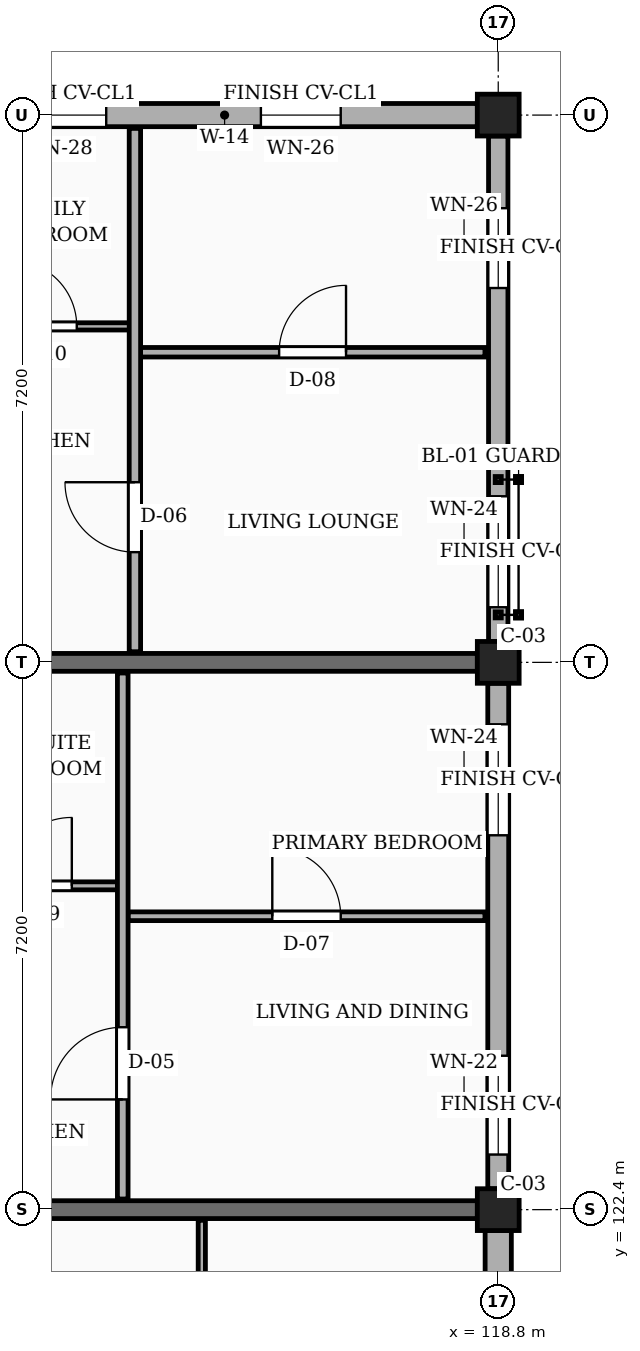
"""IFC4 building model, lengths in metres.
Left out: names, types, materials, properties, quantities, classifications, styles, units other than length and angle.
Written with IfcOpenShell. Run it as: python <this file> out.ifc"""

import sys

from ifc_helpers import new_model, si_unit, direction, frame, frame_2d, origin, origin_2d, place, context, subcontext, project, spatial, rectangle, extrude, element, fill, save


model = new_model("IFC4")
c1 = context("Model", 3, precision=1e-05, world=origin(), true_north=direction((0.0, 1.0)))
c2 = subcontext(c1, "Body", "Model", "MODEL_VIEW")
j1 = project(units=[si_unit("LENGTHUNIT", "METRE"), si_unit("PLANEANGLEUNIT", "RADIAN")], contexts=[c1])
p1 = place(None, origin())
s1 = spatial("IfcSite", under=j1, at=p1, CompositionType="ELEMENT")
p2 = place(p1, origin())
s2 = spatial("IfcBuilding", under=s1, at=p2, CompositionType="ELEMENT")
p3 = place(p2, frame((0.0, 0.0, 20.25)))
s3 = spatial("IfcBuildingStorey", under=s2, at=p3, CompositionType="ELEMENT", Elevation=20.25)
for number, where, z_axis, x_axis in (
    (1, (118.8, 122.4, 0.0), (0.0, 0.0, 1.0), (1.0, 0.0, 0.0)),
    (2, (118.8, 129.6, 0.0), (0.0, 0.0, 1.0), (1.0, 0.0, 0.0)),
    (3, (118.8, 136.8, 0.0), (0.0, 0.0, 1.0), (1.0, 0.0, 0.0)),
):
    element("IfcColumn", number, at=place(p3, frame(where, z_axis=z_axis, x_axis=x_axis)), inside=s3, PredefinedType="COLUMN", context=c2, shape_type="SweptSolid", body=[
        extrude(rectangle(XDim=0.55, YDim=0.55, at=origin_2d()), origin(), (0.0, 0.0, 1.0), 3.15),
    ])
for number, where, z_axis, x_axis in (
    (4, (111.825, 122.4, 0.0), (0.0, 0.0, 1.0), (1.0, 0.0, 0.0)),
    (5, (111.825, 129.6, 0.0), (0.0, 0.0, 1.0), (1.0, 0.0, 0.0)),
):
    element("IfcWall", number, at=place(p3, frame(where, z_axis=z_axis, x_axis=x_axis)), inside=s3, PredefinedType="SOLIDWALL", context=c2, shape_type="SweptSolid", body=[
        extrude(rectangle(XDim=6.7, YDim=0.235, at=frame_2d((3.35, 0.0))), origin(), (0.0, 0.0, 1.0), 2.19),
    ])
p4 = place(p3, frame((118.8, 115.475, 0.0), z_axis=(0.0, 0.0, 1.0), x_axis=(0.0, 1.0, 0.0)))
e6 = element("IfcWall", 6, at=p4, inside=s3, PredefinedType="SOLIDWALL", context=c2, shape_type="SweptSolid", body=[
    extrude(rectangle(XDim=6.65, YDim=0.345, at=frame_2d((3.325, 0.0))), origin(), (0.0, 0.0, 1.0), 2.46),
])
p5 = place(p4, frame((0.45, 0.0, 0.78)))
e7 = element("IfcOpeningElement", 7, at=p5, cuts=e6, PredefinedType="OPENING", context=c2, shape_type="SweptSolid", body=[
    extrude(rectangle(XDim=1.14, YDim=1.36, at=frame_2d((0.57, 0.68))), frame((0.0, 0.183, 0.0), z_axis=(0.0, -1.0, 0.0), x_axis=(1.0, 0.0, 0.0)), (0.0, 0.0, 1.0), 0.365),
])
p6 = place(p4, frame((4.65, 0.0, 0.78)))
e8 = element("IfcOpeningElement", 8, at=p6, cuts=e6, PredefinedType="OPENING", context=c2, shape_type="SweptSolid", body=[
    extrude(rectangle(XDim=1.3, YDim=1.36, at=frame_2d((0.65, 0.68))), frame((0.0, 0.183, 0.0), z_axis=(0.0, -1.0, 0.0), x_axis=(1.0, 0.0, 0.0)), (0.0, 0.0, 1.0), 0.365),
])
p7 = place(p3, frame((118.8, 122.675, 0.0), z_axis=(0.0, 0.0, 1.0), x_axis=(0.0, 1.0, 0.0)))
e9 = element("IfcWall", 9, at=p7, inside=s3, PredefinedType="SOLIDWALL", context=c2, shape_type="SweptSolid", body=[
    extrude(rectangle(XDim=6.65, YDim=0.275, at=frame_2d((3.325, 0.0))), origin(), (0.0, 0.0, 1.0), 2.46),
])
p8 = place(p7, frame((0.45, 0.0, 0.78)))
e10 = element("IfcOpeningElement", 10, at=p8, cuts=e9, PredefinedType="OPENING", context=c2, shape_type="SweptSolid", body=[
    extrude(rectangle(XDim=1.3, YDim=1.36, at=frame_2d((0.65, 0.68))), frame((0.0, 0.147, 0.0), z_axis=(0.0, -1.0, 0.0), x_axis=(1.0, 0.0, 0.0)), (0.0, 0.0, 1.0), 0.295),
])
p9 = place(p7, frame((4.65, 0.0, 0.78)))
e11 = element("IfcOpeningElement", 11, at=p9, cuts=e9, PredefinedType="OPENING", context=c2, shape_type="SweptSolid", body=[
    extrude(rectangle(XDim=1.46, YDim=1.36, at=frame_2d((0.73, 0.68))), frame((0.0, 0.147, 0.0), z_axis=(0.0, -1.0, 0.0), x_axis=(1.0, 0.0, 0.0)), (0.0, 0.0, 1.0), 0.295),
])
p10 = place(p3, frame((118.8, 129.875, 0.0), z_axis=(0.0, 0.0, 1.0), x_axis=(0.0, 1.0, 0.0)))
e12 = element("IfcWall", 12, at=p10, inside=s3, PredefinedType="SOLIDWALL", context=c2, shape_type="SweptSolid", body=[
    extrude(rectangle(XDim=6.65, YDim=0.255, at=frame_2d((3.325, 0.0))), origin(), (0.0, 0.0, 1.0), 2.46),
])
p11 = place(p10, frame((0.45, 0.0, 0.78)))
e13 = element("IfcOpeningElement", 13, at=p11, cuts=e12, PredefinedType="OPENING", context=c2, shape_type="SweptSolid", body=[
    extrude(rectangle(XDim=1.46, YDim=1.36, at=frame_2d((0.73, 0.68))), frame((0.0, 0.137, 0.0), z_axis=(0.0, -1.0, 0.0), x_axis=(1.0, 0.0, 0.0)), (0.0, 0.0, 1.0), 0.275),
])
p12 = place(p10, frame((4.65, 0.0, 0.78)))
e14 = element("IfcOpeningElement", 14, at=p12, cuts=e12, PredefinedType="OPENING", context=c2, shape_type="SweptSolid", body=[
    extrude(rectangle(XDim=1.05, YDim=1.44, at=frame_2d((0.525, 0.72))), frame((0.0, 0.137, 0.0), z_axis=(0.0, -1.0, 0.0), x_axis=(1.0, 0.0, 0.0)), (0.0, 0.0, 1.0), 0.275),
])
p13 = place(p3, frame((118.525, 136.8, 0.0), z_axis=(0.0, 0.0, 1.0), x_axis=(-1.0, 0.0, 0.0)))
e15 = element("IfcWall", 15, at=p13, inside=s3, PredefinedType="SOLIDWALL", context=c2, shape_type="SweptSolid", body=[
    extrude(rectangle(XDim=6.65, YDim=0.305, at=frame_2d((3.325, 0.0))), origin(), (0.0, 0.0, 1.0), 2.46),
])
p14 = place(p13, frame((1.798, 0.0, 0.78)))
e16 = element("IfcOpeningElement", 16, at=p14, cuts=e15, PredefinedType="OPENING", context=c2, shape_type="SweptSolid", body=[
    extrude(rectangle(XDim=1.05, YDim=1.44, at=frame_2d((0.525, 0.72))), frame((0.0, 0.163, 0.0), z_axis=(0.0, -1.0, 0.0), x_axis=(1.0, 0.0, 0.0)), (0.0, 0.0, 1.0), 0.325),
])
p15 = place(p13, frame((4.883, 0.0, 0.78)))
e17 = element("IfcOpeningElement", 17, at=p15, cuts=e15, PredefinedType="OPENING", context=c2, shape_type="SweptSolid", body=[
    extrude(rectangle(XDim=1.25, YDim=1.44, at=frame_2d((0.625, 0.72))), frame((0.0, 0.163, 0.0), z_axis=(0.0, -1.0, 0.0), x_axis=(1.0, 0.0, 0.0)), (0.0, 0.0, 1.0), 0.325),
])
p16 = place(p3, frame((114.9, 119.07, 0.0), z_axis=(0.0, 0.0, 1.0), x_axis=(0.0, 1.0, 0.0)))
e18 = element("IfcWall", 18, at=p16, inside=s3, PredefinedType="PARTITIONING", context=c2, shape_type="SweptSolid", body=[
    extrude(rectangle(XDim=3.19, YDim=0.095, at=frame_2d((1.595, 0.0))), origin(), (0.0, 0.0, 1.0), 2.325),
])
p17 = place(p3, frame((113.93, 126.26, 0.0), z_axis=(0.0, 0.0, 1.0), x_axis=(1.0, 0.0, 0.0)))
e19 = element("IfcWall", 19, at=p17, inside=s3, PredefinedType="PARTITIONING", context=c2, shape_type="SweptSolid", body=[
    extrude(rectangle(XDim=4.695, YDim=0.115, at=frame_2d((2.348, 0.0))), origin(), (0.0, 0.0, 1.0), 2.325),
])
p18 = place(p17, frame((1.897, 0.0, 0.0)))
e20 = element("IfcOpeningElement", 20, at=p18, cuts=e19, PredefinedType="OPENING", context=c2, shape_type="SweptSolid", body=[
    extrude(rectangle(XDim=0.9, YDim=2.1, at=frame_2d((0.45, 1.05))), frame((0.0, 0.067, 0.0), z_axis=(0.0, -1.0, 0.0), x_axis=(1.0, 0.0, 0.0)), (0.0, 0.0, 1.0), 0.135),
])
p19 = place(p3, frame((111.69, 126.66, 0.0), z_axis=(0.0, 0.0, 1.0), x_axis=(1.0, 0.0, 0.0)))
e21 = element("IfcWall", 21, at=p19, inside=s3, PredefinedType="PARTITIONING", context=c2, shape_type="SweptSolid", body=[
    extrude(rectangle(XDim=2.1, YDim=0.105, at=frame_2d((1.05, 0.0))), origin(), (0.0, 0.0, 1.0), 2.325),
])
p20 = place(p19, frame((0.6, 0.0, 0.0)))
e22 = element("IfcOpeningElement", 22, at=p20, cuts=e21, PredefinedType="OPENING", context=c2, shape_type="SweptSolid", body=[
    extrude(rectangle(XDim=0.9, YDim=2.05, at=frame_2d((0.45, 1.025))), frame((0.0, 0.062, 0.0), z_axis=(0.0, -1.0, 0.0), x_axis=(1.0, 0.0, 0.0)), (0.0, 0.0, 1.0), 0.125),
])
p21 = place(p3, frame((113.86, 122.54, 0.0), z_axis=(0.0, 0.0, 1.0), x_axis=(0.0, 1.0, 0.0)))
e23 = element("IfcWall", 23, at=p21, inside=s3, PredefinedType="PARTITIONING", context=c2, shape_type="SweptSolid", body=[
    extrude(rectangle(XDim=6.92, YDim=0.14, at=frame_2d((3.46, 0.0))), origin(), (0.0, 0.0, 1.0), 2.325),
])
p22 = place(p21, frame((1.31, 0.0, 0.0)))
e24 = element("IfcOpeningElement", 24, at=p22, cuts=e23, PredefinedType="OPENING", context=c2, shape_type="SweptSolid", body=[
    extrude(rectangle(XDim=0.95, YDim=2.1, at=frame_2d((0.475, 1.05))), frame((0.0, 0.08, 0.0), z_axis=(0.0, -1.0, 0.0), x_axis=(1.0, 0.0, 0.0)), (0.0, 0.0, 1.0), 0.16),
])
p23 = place(p3, frame((114.09, 133.68, 0.0), z_axis=(0.0, 0.0, 1.0), x_axis=(1.0, 0.0, 0.0)))
e25 = element("IfcWall", 25, at=p23, inside=s3, PredefinedType="PARTITIONING", context=c2, shape_type="SweptSolid", body=[
    extrude(rectangle(XDim=4.535, YDim=0.125, at=frame_2d((2.268, 0.0))), origin(), (0.0, 0.0, 1.0), 2.325),
])
p24 = place(p23, frame((1.827, 0.0, 0.0)))
e26 = element("IfcOpeningElement", 26, at=p24, cuts=e25, PredefinedType="OPENING", context=c2, shape_type="SweptSolid", body=[
    extrude(rectangle(XDim=0.88, YDim=2.08, at=frame_2d((0.44, 1.04))), frame((0.0, 0.073, 0.0), z_axis=(0.0, -1.0, 0.0), x_axis=(1.0, 0.0, 0.0)), (0.0, 0.0, 1.0), 0.145),
])
p25 = place(p3, frame((111.69, 134.02, 0.0), z_axis=(0.0, 0.0, 1.0), x_axis=(1.0, 0.0, 0.0)))
e27 = element("IfcWall", 27, at=p25, inside=s3, PredefinedType="PARTITIONING", context=c2, shape_type="SweptSolid", body=[
    extrude(rectangle(XDim=2.26, YDim=0.095, at=frame_2d((1.13, 0.0))), origin(), (0.0, 0.0, 1.0), 2.325),
])
p26 = place(p25, frame((0.695, 0.0, 0.0)))
e28 = element("IfcOpeningElement", 28, at=p26, cuts=e27, PredefinedType="OPENING", context=c2, shape_type="SweptSolid", body=[
    extrude(rectangle(XDim=0.87, YDim=2.05, at=frame_2d((0.435, 1.025))), frame((0.0, 0.058, 0.0), z_axis=(0.0, -1.0, 0.0), x_axis=(1.0, 0.0, 0.0)), (0.0, 0.0, 1.0), 0.115),
])
p27 = place(p3, frame((114.02, 129.74, 0.0), z_axis=(0.0, 0.0, 1.0), x_axis=(0.0, 1.0, 0.0)))
e29 = element("IfcWall", 29, at=p27, inside=s3, PredefinedType="PARTITIONING", context=c2, shape_type="SweptSolid", body=[
    extrude(rectangle(XDim=6.885, YDim=0.15, at=frame_2d((3.442, 0.0))), origin(), (0.0, 0.0, 1.0), 2.325),
])
p28 = place(p27, frame((1.31, 0.0, 0.0)))
e30 = element("IfcOpeningElement", 30, at=p28, cuts=e29, PredefinedType="OPENING", context=c2, shape_type="SweptSolid", body=[
    extrude(rectangle(XDim=0.92, YDim=2.1, at=frame_2d((0.46, 1.05))), frame((0.0, 0.085, 0.0), z_axis=(0.0, -1.0, 0.0), x_axis=(1.0, 0.0, 0.0)), (0.0, 0.0, 1.0), 0.17),
])
p29 = place(p8, origin())
e31 = element("IfcWindow", 31, at=p29, inside=s3, PartitioningType="SINGLE_PANEL", PredefinedType="WINDOW", context=c2, shape_type="SweptSolid", body=[
    extrude(rectangle(XDim=1.3, YDim=1.36, at=frame_2d((0.65, 0.68))), frame((0.0, 0.03, 0.0), z_axis=(0.0, -1.0, 0.0), x_axis=(1.0, 0.0, 0.0)), (0.0, 0.0, 1.0), 0.06),
])
fill(e10, e31)
p30 = place(p9, origin())
e32 = element("IfcWindow", 32, at=p30, inside=s3, PartitioningType="SINGLE_PANEL", PredefinedType="WINDOW", context=c2, shape_type="SweptSolid", body=[
    extrude(rectangle(XDim=1.46, YDim=1.36, at=frame_2d((0.73, 0.68))), frame((0.0, 0.03, 0.0), z_axis=(0.0, -1.0, 0.0), x_axis=(1.0, 0.0, 0.0)), (0.0, 0.0, 1.0), 0.06),
])
fill(e11, e32)
p31 = place(p11, origin())
e33 = element("IfcWindow", 33, at=p31, inside=s3, PartitioningType="SINGLE_PANEL", PredefinedType="WINDOW", context=c2, shape_type="SweptSolid", body=[
    extrude(rectangle(XDim=1.46, YDim=1.36, at=frame_2d((0.73, 0.68))), frame((0.0, 0.03, 0.0), z_axis=(0.0, -1.0, 0.0), x_axis=(1.0, 0.0, 0.0)), (0.0, 0.0, 1.0), 0.06),
])
fill(e13, e33)
p32 = place(p12, origin())
e34 = element("IfcWindow", 34, at=p32, inside=s3, PartitioningType="SINGLE_PANEL", PredefinedType="WINDOW", context=c2, shape_type="SweptSolid", body=[
    extrude(rectangle(XDim=1.05, YDim=1.44, at=frame_2d((0.525, 0.72))), frame((0.0, 0.03, 0.0), z_axis=(0.0, -1.0, 0.0), x_axis=(1.0, 0.0, 0.0)), (0.0, 0.0, 1.0), 0.06),
])
fill(e14, e34)
p33 = place(p14, origin())
e35 = element("IfcWindow", 35, at=p33, inside=s3, PartitioningType="SINGLE_PANEL", PredefinedType="WINDOW", context=c2, shape_type="SweptSolid", body=[
    extrude(rectangle(XDim=1.05, YDim=1.44, at=frame_2d((0.525, 0.72))), frame((0.0, 0.03, 0.0), z_axis=(0.0, -1.0, 0.0), x_axis=(1.0, 0.0, 0.0)), (0.0, 0.0, 1.0), 0.06),
])
fill(e16, e35)
p34 = place(p15, origin())
e36 = element("IfcWindow", 36, at=p34, inside=s3, PartitioningType="SINGLE_PANEL", PredefinedType="WINDOW", context=c2, shape_type="SweptSolid", body=[
    extrude(rectangle(XDim=1.25, YDim=1.44, at=frame_2d((0.625, 0.72))), frame((0.0, 0.03, 0.0), z_axis=(0.0, -1.0, 0.0), x_axis=(1.0, 0.0, 0.0)), (0.0, 0.0, 1.0), 0.06),
])
fill(e17, e36)
p35 = place(p18, origin())
e37 = element("IfcDoor", 37, at=p35, inside=s3, OperationType="SINGLE_SWING_LEFT", PredefinedType="DOOR", context=c2, shape_type="SweptSolid", body=[
    extrude(rectangle(XDim=0.9, YDim=2.1, at=frame_2d((0.45, 1.05))), frame((0.0, 0.025, 0.0), z_axis=(0.0, -1.0, 0.0), x_axis=(1.0, 0.0, 0.0)), (0.0, 0.0, 1.0), 0.05),
])
fill(e20, e37)
p36 = place(p20, origin())
e38 = element("IfcDoor", 38, at=p36, inside=s3, OperationType="SINGLE_SWING_RIGHT", PredefinedType="DOOR", context=c2, shape_type="SweptSolid", body=[
    extrude(rectangle(XDim=0.9, YDim=2.05, at=frame_2d((0.45, 1.025))), frame((0.0, 0.025, 0.0), z_axis=(0.0, -1.0, 0.0), x_axis=(1.0, 0.0, 0.0)), (0.0, 0.0, 1.0), 0.05),
])
fill(e22, e38)
p37 = place(p22, origin())
e39 = element("IfcDoor", 39, at=p37, inside=s3, OperationType="SINGLE_SWING_LEFT", PredefinedType="DOOR", context=c2, shape_type="SweptSolid", body=[
    extrude(rectangle(XDim=0.95, YDim=2.1, at=frame_2d((0.475, 1.05))), frame((0.0, 0.025, 0.0), z_axis=(0.0, -1.0, 0.0), x_axis=(1.0, 0.0, 0.0)), (0.0, 0.0, 1.0), 0.05),
])
fill(e24, e39)
p38 = place(p24, origin())
e40 = element("IfcDoor", 40, at=p38, inside=s3, OperationType="SINGLE_SWING_RIGHT", PredefinedType="DOOR", context=c2, shape_type="SweptSolid", body=[
    extrude(rectangle(XDim=0.88, YDim=2.08, at=frame_2d((0.44, 1.04))), frame((0.0, 0.025, 0.0), z_axis=(0.0, -1.0, 0.0), x_axis=(1.0, 0.0, 0.0)), (0.0, 0.0, 1.0), 0.05),
])
fill(e26, e40)
p39 = place(p26, origin())
e41 = element("IfcDoor", 41, at=p39, inside=s3, OperationType="SINGLE_SWING_LEFT", PredefinedType="DOOR", context=c2, shape_type="SweptSolid", body=[
    extrude(rectangle(XDim=0.87, YDim=2.05, at=frame_2d((0.435, 1.025))), frame((0.0, 0.025, 0.0), z_axis=(0.0, -1.0, 0.0), x_axis=(1.0, 0.0, 0.0)), (0.0, 0.0, 1.0), 0.05),
])
fill(e28, e41)
p40 = place(p28, origin())
e42 = element("IfcDoor", 42, at=p40, inside=s3, OperationType="SINGLE_SWING_RIGHT", PredefinedType="DOOR", context=c2, shape_type="SweptSolid", body=[
    extrude(rectangle(XDim=0.92, YDim=2.1, at=frame_2d((0.46, 1.05))), frame((0.0, 0.025, 0.0), z_axis=(0.0, -1.0, 0.0), x_axis=(1.0, 0.0, 0.0)), (0.0, 0.0, 1.0), 0.05),
])
fill(e30, e42)
save(model, sys.argv[1])
